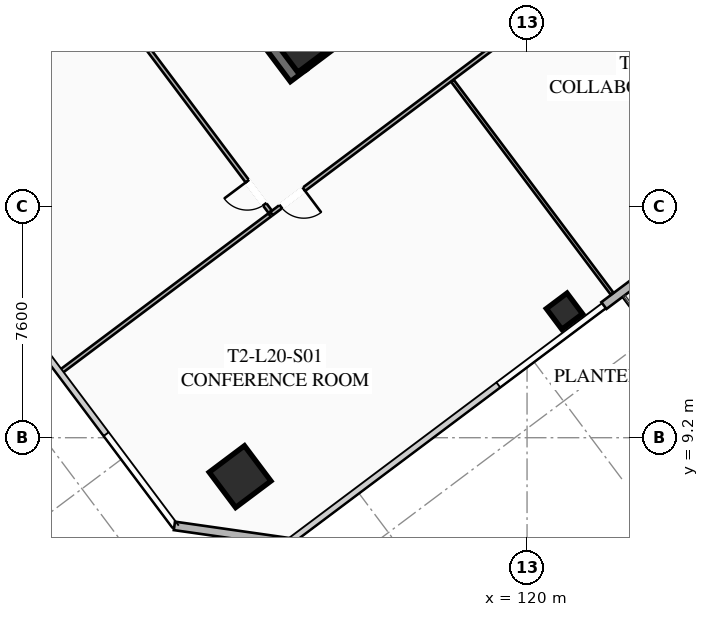
"""IFC4 building model, lengths in metres.
Left out: names, types, materials, properties, quantities, classifications, styles, units other than length and angle.
Written with IfcOpenShell. Run it as: python <this file> out.ifc"""

import sys

from ifc_helpers import new_model, si_unit, direction, frame, frame_2d, origin, origin_2d, place, context, subcontext, project, spatial, rectangle, hollow_rectangle, extrude, element, fill, save


model = new_model("IFC4")
c1 = context("Model", 3, precision=1e-05, world=origin(), true_north=direction((0.0, 1.0)))
c2 = subcontext(c1, "Body", "Model", "MODEL_VIEW")
j1 = project(units=[si_unit("LENGTHUNIT", "METRE"), si_unit("PLANEANGLEUNIT", "RADIAN")], contexts=[c1])
p1 = place(None, origin())
s1 = spatial("IfcSite", under=j1, at=p1, CompositionType="ELEMENT")
p2 = place(p1, origin())
s2 = spatial("IfcBuilding", under=s1, at=p2, CompositionType="ELEMENT")
p3 = place(p2, frame((0.0, 0.0, 77.85)))
s3 = spatial("IfcBuildingStorey", under=s2, at=p3, CompositionType="ELEMENT", Elevation=77.85)
p4 = place(p3, frame((112.476, 21.107, 0.0), z_axis=(0.0, 0.0, 1.0), x_axis=(-0.600005007985, 0.799996243986, 0.0)))
e1 = element("IfcWall", 1, at=p4, inside=s3, PredefinedType="SHEAR", context=c2, shape_type="SweptSolid", body=[
    extrude(rectangle(XDim=15.6, YDim=0.65, at=frame_2d((7.8, 0.0))), origin(), (0.0, 0.0, 1.0), 3.55),
])
p5 = place(p3, frame((124.429, 30.478, 0.0), z_axis=(0.0, 0.0, 1.0), x_axis=(-0.799998028465, -0.600002628705, 0.0)))
e2 = element("IfcWall", 2, at=p5, inside=s3, PredefinedType="SHEAR", context=c2, shape_type="SweptSolid", body=[
    extrude(rectangle(XDim=14.86, YDim=0.65, at=frame_2d((7.43, 0.0))), origin(), (0.0, 0.0, 1.0), 3.55),
])
p6 = place(p5, frame((9.13, 0.0, 0.0)))
e3 = element("IfcOpeningElement", 3, at=p6, cuts=e2, PredefinedType="OPENING", context=c2, shape_type="SweptSolid", body=[
    extrude(rectangle(XDim=1.25, YDim=2.25, at=frame_2d((0.625, 1.125))), frame((0.0, 0.335, 0.0), z_axis=(0.0, -1.0, 0.0), x_axis=(1.0, 0.0, 0.0)), (0.0, 0.0, 1.0), 0.67),
])
p7 = place(p5, frame((4.08, 0.0, 0.0)))
e4 = element("IfcOpeningElement", 4, at=p7, cuts=e2, PredefinedType="OPENING", context=c2, shape_type="SweptSolid", body=[
    extrude(rectangle(XDim=1.25, YDim=2.25, at=frame_2d((0.625, 1.125))), frame((0.0, 0.335, 0.0), z_axis=(0.0, -1.0, 0.0), x_axis=(1.0, 0.0, 0.0)), (0.0, 0.0, 1.0), 0.67),
])
p8 = place(p3, frame((112.59, 22.13, 0.0), z_axis=(0.0, 0.0, 1.0), x_axis=(0.799999996291, 0.600000004945, 0.0)))
e5 = element("IfcColumn", 5, at=p8, inside=s3, PredefinedType="COLUMN", context=c2, shape_type="SweptSolid", body=[
    extrude(hollow_rectangle(XDim=1.3, YDim=1.3, WallThickness=0.05, at=origin_2d()), origin(), (0.0, 0.0, 1.0), 3.35),
])
p9 = place(p3, frame((110.56, 7.92, 0.0), z_axis=(0.0, 0.0, 1.0), x_axis=(0.799999996291, 0.600000004945, 0.0)))
e6 = element("IfcColumn", 6, at=p9, inside=s3, PredefinedType="COLUMN", context=c2, shape_type="SweptSolid", body=[
    extrude(hollow_rectangle(XDim=1.45, YDim=1.45, WallThickness=0.055, at=origin_2d()), origin(), (0.0, 0.0, 1.0), 3.35),
])
p10 = place(p3, frame((121.23, 13.36, 0.0), z_axis=(0.0, 0.0, 1.0), x_axis=(0.799999996291, 0.600000004945, 0.0)))
e7 = element("IfcColumn", 7, at=p10, inside=s3, PredefinedType="COLUMN", context=c2, shape_type="SweptSolid", body=[
    extrude(hollow_rectangle(XDim=0.85, YDim=0.85, WallThickness=0.035, at=origin_2d()), origin(), (0.0, 0.0, 1.0), 3.35),
])
p11 = place(p3, frame((129.328, 18.646, 0.0), z_axis=(0.0, 0.0, 1.0), x_axis=(-0.799986212866, -0.600018382406, 0.0)))
e8 = element("IfcWall", 8, at=p11, inside=s3, PredefinedType="SOLIDWALL", context=c2, shape_type="SweptSolid", body=[
    extrude(rectangle(XDim=8.5, YDim=0.28, at=frame_2d((4.25, 0.0))), origin(), (0.0, 0.0, 1.0), 3.35),
])
p12 = place(p11, frame((3.6, 0.0, 0.0)))
e9 = element("IfcOpeningElement", 9, at=p12, cuts=e8, PredefinedType="OPENING", context=c2, shape_type="SweptSolid", body=[
    extrude(rectangle(XDim=1.3, YDim=2.15, at=frame_2d((0.65, 1.075))), frame((0.0, 0.15, 0.0), z_axis=(0.0, -1.0, 0.0), x_axis=(1.0, 0.0, 0.0)), (0.0, 0.0, 1.0), 0.3),
])
p13 = place(p11, frame((1.46, 0.0, 0.85)))
e10 = element("IfcOpeningElement", 10, at=p13, cuts=e8, PredefinedType="OPENING", context=c2, shape_type="SweptSolid", body=[
    extrude(rectangle(XDim=1.8, YDim=1.92, at=frame_2d((0.9, 0.96))), frame((0.0, 0.15, 0.0), z_axis=(0.0, -1.0, 0.0), x_axis=(1.0, 0.0, 0.0)), (0.0, 0.0, 1.0), 0.3),
])
p14 = place(p3, frame((112.18, 5.76, 0.0), z_axis=(0.0, 0.0, 1.0), x_axis=(-0.989948214866, 0.141430307517, 0.0)))
e11 = element("IfcWall", 11, at=p14, inside=s3, PredefinedType="SOLIDWALL", context=c2, shape_type="SweptSolid", body=[
    extrude(rectangle(XDim=3.818, YDim=0.28, at=frame_2d((1.909, 0.0))), origin(), (0.0, 0.0, 1.0), 3.35),
])
p15 = place(p3, frame((134.18, 33.51, 0.0), z_axis=(0.0, 0.0, 1.0), x_axis=(-0.8, -0.6, 0.0)))
e12 = element("IfcWall", 12, at=p15, inside=s3, PredefinedType="PARTITIONING", context=c2, shape_type="SweptSolid", body=[
    extrude(rectangle(XDim=28.23, YDim=0.135, at=frame_2d((14.115, 0.0))), origin(), (0.0, 0.0, 1.0), 2.703),
])
p16 = place(p15, frame((26.9, 0.0, 0.0)))
e13 = element("IfcOpeningElement", 13, at=p16, cuts=e12, PredefinedType="OPENING", context=c2, shape_type="SweptSolid", body=[
    extrude(rectangle(XDim=0.95, YDim=2.05, at=frame_2d((0.475, 1.025))), frame((0.0, 0.077, 0.0), z_axis=(0.0, -1.0, 0.0), x_axis=(1.0, 0.0, 0.0)), (0.0, 0.0, 1.0), 0.155),
])
p17 = place(p15, frame((16.453, 0.0, 0.0)))
e14 = element("IfcOpeningElement", 14, at=p17, cuts=e12, PredefinedType="OPENING", context=c2, shape_type="SweptSolid", body=[
    extrude(rectangle(XDim=0.95, YDim=2.05, at=frame_2d((0.475, 1.025))), frame((0.0, 0.077, 0.0), z_axis=(0.0, -1.0, 0.0), x_axis=(1.0, 0.0, 0.0)), (0.0, 0.0, 1.0), 0.155),
])
p18 = place(p15, frame((0.38, 0.0, 0.0)))
e15 = element("IfcOpeningElement", 15, at=p18, cuts=e12, PredefinedType="OPENING", context=c2, shape_type="SweptSolid", body=[
    extrude(rectangle(XDim=0.95, YDim=2.05, at=frame_2d((0.475, 1.025))), frame((0.0, 0.077, 0.0), z_axis=(0.0, -1.0, 0.0), x_axis=(1.0, 0.0, 0.0)), (0.0, 0.0, 1.0), 0.155),
])
p19 = place(p3, frame((122.798, 13.936, 0.0), z_axis=(0.0, 0.0, 1.0), x_axis=(-0.6, 0.8, 0.0)))
e16 = element("IfcWall", 16, at=p19, inside=s3, PredefinedType="PARTITIONING", context=c2, shape_type="SweptSolid", body=[
    extrude(rectangle(XDim=8.75, YDim=0.11, at=frame_2d((4.375, 0.0))), origin(), (0.0, 0.0, 1.0), 2.703),
])
p20 = place(p3, frame((111.548, 16.636, 0.0), z_axis=(0.0, 0.0, 1.0), x_axis=(-0.600003610192, 0.799997292343, 0.0)))
e17 = element("IfcWall", 17, at=p20, inside=s3, PredefinedType="PARTITIONING", context=c2, shape_type="SweptSolid", body=[
    extrude(rectangle(XDim=21.64, YDim=0.135, at=frame_2d((10.82, 0.0))), origin(), (0.0, 0.0, 1.0), 2.703),
])
p21 = place(p20, frame((0.3, 0.0, 0.0)))
e18 = element("IfcOpeningElement", 18, at=p21, cuts=e17, PredefinedType="OPENING", context=c2, shape_type="SweptSolid", body=[
    extrude(rectangle(XDim=0.95, YDim=2.05, at=frame_2d((0.475, 1.025))), frame((0.0, 0.077, 0.0), z_axis=(0.0, -1.0, 0.0), x_axis=(1.0, 0.0, 0.0)), (0.0, 0.0, 1.0), 0.155),
])
p22 = place(p3, frame((104.636, 11.352, 0.0), z_axis=(0.0, 0.0, 1.0), x_axis=(0.800006797429, 0.599990936654, 0.0)))
e19 = element("IfcWall", 19, at=p22, inside=s3, PredefinedType="PARTITIONING", context=c2, shape_type="SweptSolid", body=[
    extrude(rectangle(XDim=8.62, YDim=0.135, at=frame_2d((4.31, 0.0))), origin(), (0.0, 0.0, 1.0), 2.703),
])
p23 = place(p16, origin())
e20 = element("IfcDoor", 20, at=p23, inside=s3, OperationType="SINGLE_SWING_LEFT", PredefinedType="DOOR", context=c2, shape_type="SweptSolid", body=[
    extrude(rectangle(XDim=0.95, YDim=2.05, at=frame_2d((0.475, 1.025))), frame((0.0, 0.025, 0.0), z_axis=(0.0, -1.0, 0.0), x_axis=(1.0, 0.0, 0.0)), (0.0, 0.0, 1.0), 0.05),
])
fill(e13, e20)
p24 = place(p21, origin())
e21 = element("IfcDoor", 21, at=p24, inside=s3, OperationType="SINGLE_SWING_RIGHT", PredefinedType="DOOR", context=c2, shape_type="SweptSolid", body=[
    extrude(rectangle(XDim=0.95, YDim=2.05, at=frame_2d((0.475, 1.025))), frame((0.0, 0.025, 0.0), z_axis=(0.0, -1.0, 0.0), x_axis=(1.0, 0.0, 0.0)), (0.0, 0.0, 1.0), 0.05),
])
fill(e18, e21)
save(model, sys.argv[1])
